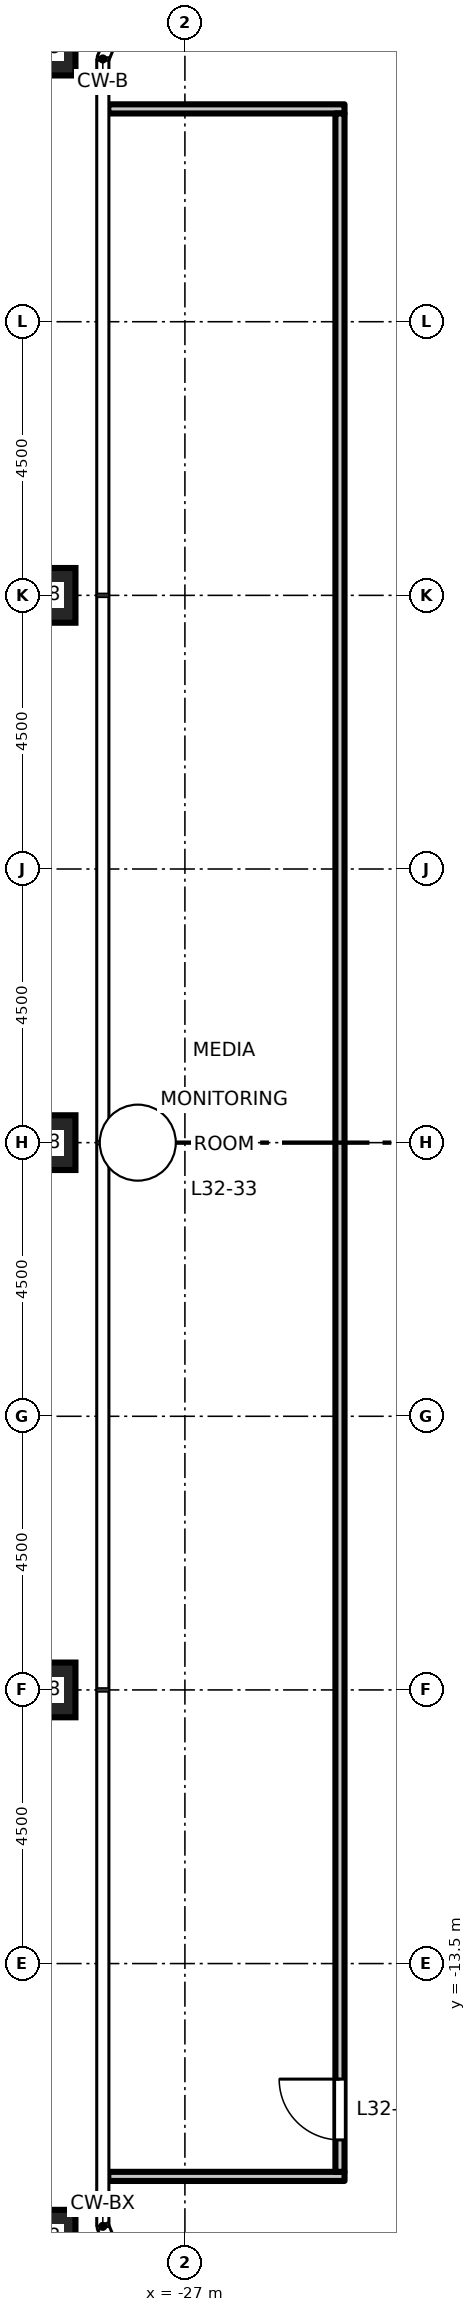
"""IFC4 building model, lengths in metres.
Left out: names, types, materials, properties, quantities, classifications, styles, units other than length and angle.
Written with IfcOpenShell. Run it as: python <this file> out.ifc"""

import sys

from ifc_helpers import new_model, si_unit, direction, frame, frame_2d, origin, origin_2d, place, context, subcontext, project, spatial, rectangle, hollow_rectangle, extrude, element, fill, save


model = new_model("IFC4")
c1 = context("Model", 3, precision=1e-05, world=origin(), true_north=direction((0.0, 1.0)))
c2 = subcontext(c1, "Body", "Model", "MODEL_VIEW")
j1 = project(units=[si_unit("LENGTHUNIT", "METRE"), si_unit("PLANEANGLEUNIT", "RADIAN")], contexts=[c1])
p1 = place(None, origin())
s1 = spatial("IfcSite", under=j1, at=p1, CompositionType="ELEMENT")
p2 = place(p1, origin())
s2 = spatial("IfcBuilding", under=s1, at=p2, CompositionType="ELEMENT")
p3 = place(p2, frame((0.0, 0.0, 149.7)))
s3 = spatial("IfcBuildingStorey", under=s2, at=p3, CompositionType="ELEMENT", Elevation=149.7)
for number, where, z_axis, x_axis in (
    (1, (-29.25, 18.0, 0.0), (0.0, 0.0, 1.0), (1.0, 0.0, 0.0)),
    (2, (-29.25, 9.0, 0.0), (0.0, 0.0, 1.0), (1.0, 0.0, 0.0)),
    (3, (-29.25, 0.0, 0.0), (0.0, 0.0, 1.0), (1.0, 0.0, 0.0)),
    (4, (-29.25, -9.0, 0.0), (0.0, 0.0, 1.0), (1.0, 0.0, 0.0)),
    (5, (-29.25, -18.0, 0.0), (0.0, 0.0, 1.0), (1.0, 0.0, 0.0)),
):
    element("IfcColumn", number, at=place(p3, frame(where, z_axis=z_axis, x_axis=x_axis)), inside=s3, PredefinedType="COLUMN", context=c2, shape_type="SweptSolid", body=[
        extrude(hollow_rectangle(XDim=0.9, YDim=0.9, WallThickness=0.05, at=origin_2d()), origin(), (0.0, 0.0, 1.0), 4.5),
    ])
for number, where, z_axis, x_axis in (
    (6, (-28.26, -17.0, 0.0), (0.0, 0.0, 1.0), (1.0, 0.0, 0.0)),
    (7, (-28.26, 17.0, 0.0), (0.0, 0.0, 1.0), (1.0, 0.0, 0.0)),
):
    element("IfcWall", number, at=place(p3, frame(where, z_axis=z_axis, x_axis=x_axis)), inside=s3, PredefinedType="PARTITIONING", context=c2, shape_type="SweptSolid", body=[
        extrude(rectangle(XDim=3.885, YDim=0.15, at=frame_2d((1.942, 0.0))), origin(), (0.0, 0.0, 1.0), 4.35),
    ])
p4 = place(p3, frame((-24.45, -16.925, 0.0), z_axis=(0.0, 0.0, 1.0), x_axis=(0.0, 1.0, 0.0)))
e8 = element("IfcWall", 8, at=p4, inside=s3, PredefinedType="PARTITIONING", context=c2, shape_type="SweptSolid", body=[
    extrude(rectangle(XDim=33.85, YDim=0.15, at=frame_2d((16.925, 0.0))), origin(), (0.0, 0.0, 1.0), 4.35),
])
p5 = place(p4, frame((0.525, 0.0, 0.0)))
e9 = element("IfcOpeningElement", 9, at=p5, cuts=e8, PredefinedType="OPENING", context=c2, shape_type="SweptSolid", body=[
    extrude(rectangle(XDim=1.0, YDim=2.1, at=frame_2d((0.5, 1.05))), frame((0.0, 0.085, 0.0), z_axis=(0.0, -1.0, 0.0), x_axis=(1.0, 0.0, 0.0)), (0.0, 0.0, 1.0), 0.17),
])
p6 = place(p5, origin())
e10 = element("IfcDoor", 10, at=p6, inside=s3, OperationType="SINGLE_SWING_RIGHT", PredefinedType="DOOR", context=c2, shape_type="SweptSolid", body=[
    extrude(rectangle(XDim=1.0, YDim=2.1, at=frame_2d((0.5, 1.05))), frame((0.0, 0.025, 0.0), z_axis=(0.0, -1.0, 0.0), x_axis=(1.0, 0.0, 0.0)), (0.0, 0.0, 1.0), 0.05),
])
fill(e9, e10)
save(model, sys.argv[1])
